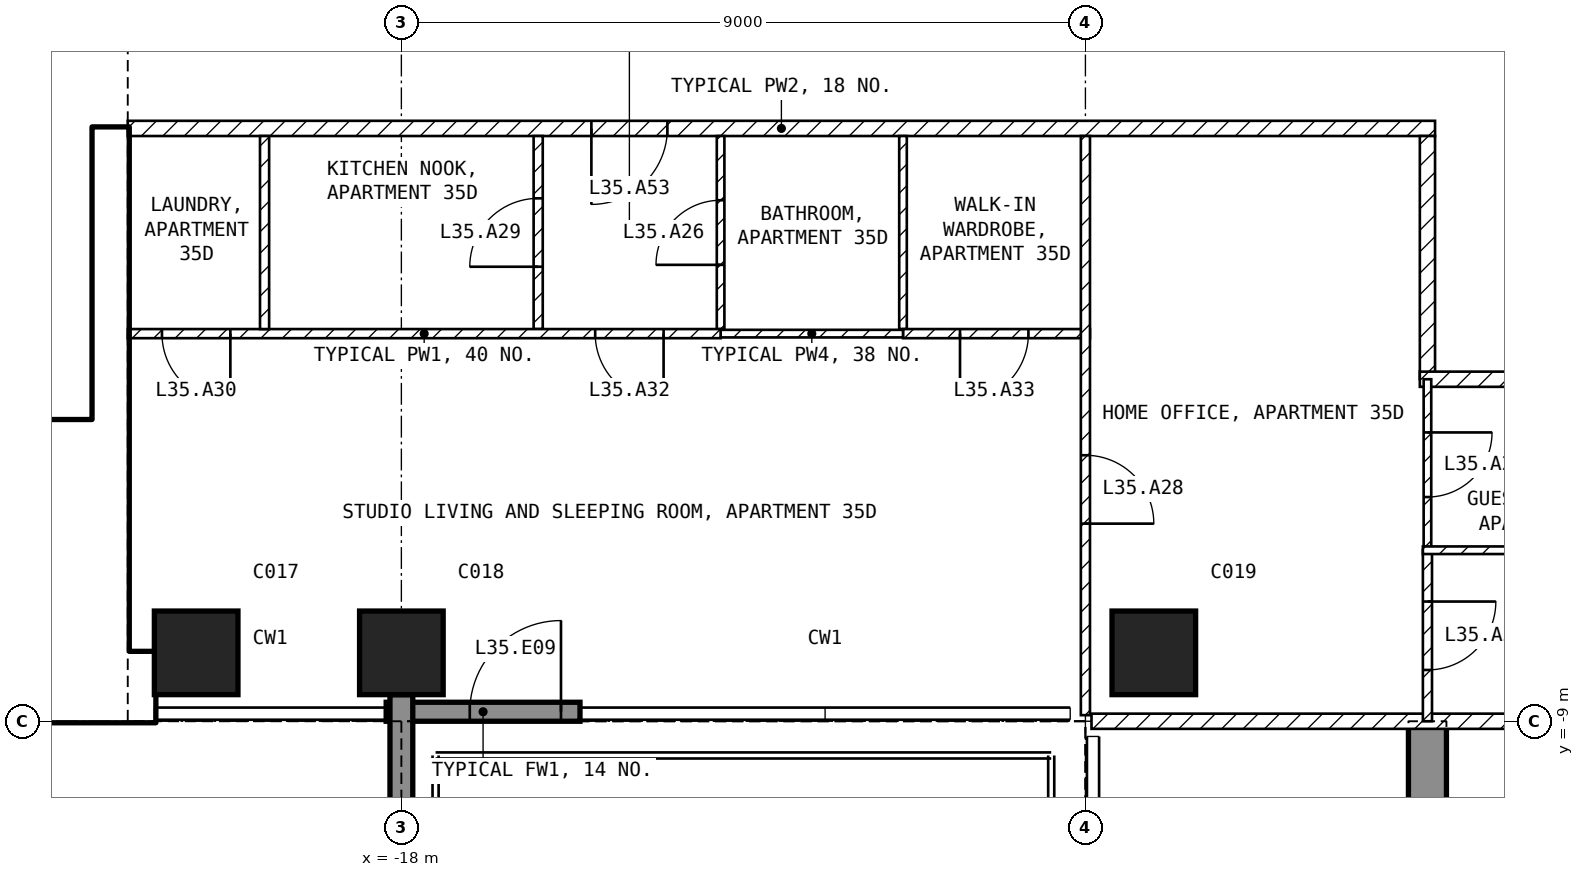
"""IFC4 building model, lengths in metres.
Left out: names, types, materials, properties, quantities, classifications, styles, units other than length and angle.
Written with IfcOpenShell. Run it as: python <this file> out.ifc"""

import sys

from ifc_helpers import new_model, si_unit, direction, frame, frame_2d, origin, origin_2d, place, context, subcontext, project, spatial, polyline, rectangle, outline, extrude, element, fill, save


model = new_model("IFC4")
c1 = context("Model", 3, precision=1e-05, world=origin(), true_north=direction((0.0, 1.0)))
c2 = subcontext(c1, "Body", "Model", "MODEL_VIEW")
j1 = project(units=[si_unit("LENGTHUNIT", "METRE"), si_unit("PLANEANGLEUNIT", "RADIAN")], contexts=[c1])
p1 = place(None, origin())
s1 = spatial("IfcSite", under=j1, at=p1, CompositionType="ELEMENT")
p2 = place(p1, origin())
s2 = spatial("IfcBuilding", under=s1, at=p2, CompositionType="ELEMENT")
p3 = place(p2, frame((0.0, 0.0, 144.4)))
s3 = spatial("IfcBuildingStorey", under=s2, at=p3, CompositionType="ELEMENT", Elevation=144.4)
for number, where, z_axis, x_axis in (
    (1, (-20.7, -8.1, -0.25), (0.0, 0.0, 1.0), (1.0, 0.0, 0.0)),
    (2, (-18.0, -8.1, -0.25), (0.0, 0.0, 1.0), (1.0, 0.0, 0.0)),
    (3, (-8.1, -8.1, -0.25), (0.0, 0.0, 1.0), (1.0, 0.0, 0.0)),
):
    element("IfcColumn", number, at=place(p3, frame(where, z_axis=z_axis, x_axis=x_axis)), inside=s3, PredefinedType="COLUMN", context=c2, shape_type="SweptSolid", body=[
        extrude(rectangle(XDim=1.1, YDim=1.1, at=origin_2d()), origin(), (0.0, 0.0, 1.0), 3.5),
    ])
p4 = place(p3, frame((-4.75, -20.15, -0.25), z_axis=(1.0, 0.0, 0.0), x_axis=(0.0, 1.0, 0.0)))
e4 = element("IfcWall", 4, at=p4, inside=s3, PredefinedType="SHEAR", context=c2, shape_type="SweptSolid", body=[
    extrude(outline(polyline([(0.0, 0.0), (6.65, 0.0), (6.65, 2.65), (9.05, 2.65), (9.05, 0.0), (11.15, 0.0), (11.15, 3.5), (0.0, 3.5), (0.0, 0.0)])), origin(), (0.0, 0.0, 1.0), 0.5),
])
p5 = place(p3, frame((-18.2, -8.875, 0.0), z_axis=(0.0, 0.0, 1.0), x_axis=(1.0, 0.0, 0.0)))
e5 = element("IfcWall", 5, at=p5, inside=s3, PredefinedType="SOLIDWALL", context=c2, shape_type="SweptSolid", body=[
    extrude(rectangle(XDim=2.55, YDim=0.25, at=frame_2d((1.275, 0.0))), origin(), (0.0, 0.0, 1.0), 3.25),
])
p6 = place(p5, frame((1.1, 0.0, 0.0)))
e6 = element("IfcOpeningElement", 6, at=p6, cuts=e5, PredefinedType="OPENING", context=c2, shape_type="SweptSolid", body=[
    extrude(rectangle(XDim=1.2, YDim=2.4, at=frame_2d((0.6, 1.2))), frame((0.0, 0.135, 0.0), z_axis=(0.0, -1.0, 0.0), x_axis=(1.0, 0.0, 0.0)), (0.0, 0.0, 1.0), 0.27),
])
p7 = place(p3, frame((-18.0, -8.65, 0.0), z_axis=(0.0, 0.0, 1.0), x_axis=(0.0, -1.0, 0.0)))
e7 = element("IfcWall", 7, at=p7, inside=s3, PredefinedType="SOLIDWALL", context=c2, shape_type="SweptSolid", body=[
    extrude(rectangle(XDim=3.09, YDim=0.3, at=frame_2d((1.545, 0.0))), origin(), (0.0, 0.0, 1.0), 3.25),
])
p8 = place(p3, frame((-30.2, -8.55, 0.0), z_axis=(0.0, 0.0, 1.0), x_axis=(1.0, 0.0, 0.0)))
e8 = element("IfcWall", 8, at=p8, inside=s3, PredefinedType="SHEAR", context=c2, shape_type="SweptSolid", body=[
    extrude(rectangle(XDim=8.95, YDim=0.9, at=frame_2d((4.475, 0.0))), origin(), (0.0, 0.0, 1.0), 3.25),
])
p9 = place(p3, frame((-21.825, -8.1, 0.0), z_axis=(0.0, 0.0, 1.0), x_axis=(0.0, 1.0, 0.0)))
e9 = element("IfcWall", 9, at=p9, inside=s3, PredefinedType="SHEAR", context=c2, shape_type="SweptSolid", body=[
    extrude(rectangle(XDim=6.9, YDim=0.45, at=frame_2d((3.45, 0.0))), origin(), (0.0, 0.0, 1.0), 3.25),
])
p10 = place(p3, frame((-28.35, -5.15, 0.0), z_axis=(0.0, 0.0, 1.0), x_axis=(1.0, 0.0, 0.0)))
e10 = element("IfcWall", 10, at=p10, inside=s3, PredefinedType="SOLIDWALL", context=c2, shape_type="SweptSolid", body=[
    extrude(rectangle(XDim=6.3, YDim=0.2, at=frame_2d((3.15, 0.0))), origin(), (0.0, 0.0, 1.0), 3.25),
])
p11 = place(p10, frame((5.1, 0.0, 0.0)))
e11 = element("IfcOpeningElement", 11, at=p11, cuts=e10, PredefinedType="OPENING", context=c2, shape_type="SweptSolid", body=[
    extrude(rectangle(XDim=1.0, YDim=2.1, at=frame_2d((0.5, 1.05))), frame((0.0, 0.11, 0.0), z_axis=(0.0, -1.0, 0.0), x_axis=(1.0, 0.0, 0.0)), (0.0, 0.0, 1.0), 0.22),
])
p12 = place(p3, frame((-4.4, -1.2, 0.0), z_axis=(0.0, 0.0, 1.0), x_axis=(-1.0, 0.0, 0.0)))
e12 = element("IfcWall", 12, at=p12, inside=s3, PredefinedType="PARTITIONING", context=c2, shape_type="SweptSolid", body=[
    extrude(rectangle(XDim=17.2, YDim=0.2, at=frame_2d((8.6, 0.0))), origin(), (0.0, 0.0, 1.0), 3.25),
])
p13 = place(p12, frame((10.1, 0.0, 0.0)))
e13 = element("IfcOpeningElement", 13, at=p13, cuts=e12, PredefinedType="OPENING", context=c2, shape_type="SweptSolid", body=[
    extrude(rectangle(XDim=1.0, YDim=2.1, at=frame_2d((0.5, 1.05))), frame((0.0, 0.11, 0.0), z_axis=(0.0, -1.0, 0.0), x_axis=(1.0, 0.0, 0.0)), (0.0, 0.0, 1.0), 0.22),
])
p14 = place(p3, frame((-4.5, -4.5, 0.0), z_axis=(0.0, 0.0, 1.0), x_axis=(0.0, 1.0, 0.0)))
e14 = element("IfcWall", 14, at=p14, inside=s3, PredefinedType="PARTITIONING", context=c2, shape_type="SweptSolid", body=[
    extrude(rectangle(XDim=3.2, YDim=0.2, at=frame_2d((1.6, 0.0))), origin(), (0.0, 0.0, 1.0), 3.25),
])
p15 = place(p3, frame((-1.1, -4.5, 0.0), z_axis=(0.0, 0.0, 1.0), x_axis=(-1.0, 0.0, 0.0)))
e15 = element("IfcWall", 15, at=p15, inside=s3, PredefinedType="PARTITIONING", context=c2, shape_type="SweptSolid", body=[
    extrude(rectangle(XDim=3.5, YDim=0.2, at=frame_2d((1.75, 0.0))), origin(), (0.0, 0.0, 1.0), 3.25),
])
p16 = place(p3, frame((8.92, -9.0, 0.0), z_axis=(0.0, 0.0, 1.0), x_axis=(-1.0, 0.0, 0.0)))
e16 = element("IfcWall", 16, at=p16, inside=s3, PredefinedType="PARTITIONING", context=c2, shape_type="SweptSolid", body=[
    extrude(rectangle(XDim=17.84, YDim=0.2, at=frame_2d((8.92, 0.0))), origin(), (0.0, 0.0, 1.0), 3.25),
])
p17 = place(p16, frame((8.42, 0.0, 0.0)))
e17 = element("IfcOpeningElement", 17, at=p17, cuts=e16, PredefinedType="OPENING", context=c2, shape_type="SweptSolid", body=[
    extrude(rectangle(XDim=1.0, YDim=2.1, at=frame_2d((0.5, 1.05))), frame((0.0, 0.11, 0.0), z_axis=(0.0, -1.0, 0.0), x_axis=(1.0, 0.0, 0.0)), (0.0, 0.0, 1.0), 0.22),
])
p18 = place(p3, frame((-11.4, -3.84, 0.0), z_axis=(0.0, 0.0, 1.0), x_axis=(0.0, 1.0, 0.0)))
e18 = element("IfcWall", 18, at=p18, inside=s3, PredefinedType="PARTITIONING", context=c2, shape_type="SweptSolid", body=[
    extrude(rectangle(XDim=2.54, YDim=0.1, at=frame_2d((1.27, 0.0))), origin(), (0.0, 0.0, 1.0), 3.25),
])
p19 = place(p3, frame((-8.94, -3.9, 0.0), z_axis=(0.0, 0.0, 1.0), x_axis=(-1.0, 0.0, 0.0)))
e19 = element("IfcWall", 19, at=p19, inside=s3, PredefinedType="PARTITIONING", context=c2, shape_type="SweptSolid", body=[
    extrude(rectangle(XDim=2.46, YDim=0.12, at=frame_2d((1.23, 0.0))), origin(), (0.0, 0.0, 1.0), 3.25),
])
p20 = place(p19, frame((0.81, 0.0, 0.0)))
e20 = element("IfcOpeningElement", 20, at=p20, cuts=e19, PredefinedType="OPENING", context=c2, shape_type="SweptSolid", body=[
    extrude(rectangle(XDim=0.9, YDim=2.1, at=frame_2d((0.45, 1.05))), frame((0.0, 0.07, 0.0), z_axis=(0.0, -1.0, 0.0), x_axis=(1.0, 0.0, 0.0)), (0.0, 0.0, 1.0), 0.14),
])
p21 = place(p3, frame((-9.0, -1.3, 0.0), z_axis=(0.0, 0.0, 1.0), x_axis=(0.0, -1.0, 0.0)))
e21 = element("IfcWall", 21, at=p21, inside=s3, PredefinedType="PARTITIONING", context=c2, shape_type="SweptSolid", body=[
    extrude(rectangle(XDim=7.62, YDim=0.12, at=frame_2d((3.81, 0.0))), origin(), (0.0, 0.0, 1.0), 3.25),
])
p22 = place(p21, frame((4.2, 0.0, 0.0)))
e22 = element("IfcOpeningElement", 22, at=p22, cuts=e21, PredefinedType="OPENING", context=c2, shape_type="SweptSolid", body=[
    extrude(rectangle(XDim=0.9, YDim=2.1, at=frame_2d((0.45, 1.05))), frame((0.0, 0.07, 0.0), z_axis=(0.0, -1.0, 0.0), x_axis=(1.0, 0.0, 0.0)), (0.0, 0.0, 1.0), 0.14),
])
p23 = place(p3, frame((-13.8, -3.84, 0.0), z_axis=(0.0, 0.0, 1.0), x_axis=(0.0, 1.0, 0.0)))
e23 = element("IfcWall", 23, at=p23, inside=s3, PredefinedType="PARTITIONING", context=c2, shape_type="SweptSolid", body=[
    extrude(rectangle(XDim=2.54, YDim=0.1, at=frame_2d((1.27, 0.0))), origin(), (0.0, 0.0, 1.0), 3.25),
])
p24 = place(p23, frame((0.845, 0.0, 0.0)))
e24 = element("IfcOpeningElement", 24, at=p24, cuts=e23, PredefinedType="OPENING", context=c2, shape_type="SweptSolid", body=[
    extrude(rectangle(XDim=0.85, YDim=2.1, at=frame_2d((0.425, 1.05))), frame((0.0, 0.06, 0.0), z_axis=(0.0, -1.0, 0.0), x_axis=(1.0, 0.0, 0.0)), (0.0, 0.0, 1.0), 0.12),
])
p25 = place(p3, frame((-11.4, -3.9, 0.0), z_axis=(0.0, 0.0, 1.0), x_axis=(-1.0, 0.0, 0.0)))
e25 = element("IfcWall", 25, at=p25, inside=s3, PredefinedType="PARTITIONING", context=c2, shape_type="SweptSolid", body=[
    extrude(rectangle(XDim=2.4, YDim=0.1, at=frame_2d((1.2, 0.0))), origin(), (0.0, 0.0, 1.0), 3.25),
])
p26 = place(p3, frame((-16.2, -3.84, 0.0), z_axis=(0.0, 0.0, 1.0), x_axis=(0.0, 1.0, 0.0)))
e26 = element("IfcWall", 26, at=p26, inside=s3, PredefinedType="PARTITIONING", context=c2, shape_type="SweptSolid", body=[
    extrude(rectangle(XDim=2.54, YDim=0.12, at=frame_2d((1.27, 0.0))), origin(), (0.0, 0.0, 1.0), 3.25),
])
p27 = place(p26, frame((0.82, 0.0, 0.0)))
e27 = element("IfcOpeningElement", 27, at=p27, cuts=e26, PredefinedType="OPENING", context=c2, shape_type="SweptSolid", body=[
    extrude(rectangle(XDim=0.9, YDim=2.1, at=frame_2d((0.45, 1.05))), frame((0.0, 0.07, 0.0), z_axis=(0.0, -1.0, 0.0), x_axis=(1.0, 0.0, 0.0)), (0.0, 0.0, 1.0), 0.14),
])
p28 = place(p3, frame((-13.8, -3.9, 0.0), z_axis=(0.0, 0.0, 1.0), x_axis=(-1.0, 0.0, 0.0)))
e28 = element("IfcWall", 28, at=p28, inside=s3, PredefinedType="PARTITIONING", context=c2, shape_type="SweptSolid", body=[
    extrude(rectangle(XDim=7.8, YDim=0.12, at=frame_2d((3.9, 0.0))), origin(), (0.0, 0.0, 1.0), 3.25),
])
p29 = place(p28, frame((6.45, 0.0, 0.0)))
e29 = element("IfcOpeningElement", 29, at=p29, cuts=e28, PredefinedType="OPENING", context=c2, shape_type="SweptSolid", body=[
    extrude(rectangle(XDim=0.9, YDim=2.1, at=frame_2d((0.45, 1.05))), frame((0.0, 0.07, 0.0), z_axis=(0.0, -1.0, 0.0), x_axis=(1.0, 0.0, 0.0)), (0.0, 0.0, 1.0), 0.14),
])
p30 = place(p28, frame((0.75, 0.0, 0.0)))
e30 = element("IfcOpeningElement", 30, at=p30, cuts=e28, PredefinedType="OPENING", context=c2, shape_type="SweptSolid", body=[
    extrude(rectangle(XDim=0.9, YDim=2.1, at=frame_2d((0.45, 1.05))), frame((0.0, 0.07, 0.0), z_axis=(0.0, -1.0, 0.0), x_axis=(1.0, 0.0, 0.0)), (0.0, 0.0, 1.0), 0.14),
])
p31 = place(p3, frame((-19.8, -3.84, 0.0), z_axis=(0.0, 0.0, 1.0), x_axis=(0.0, 1.0, 0.0)))
e31 = element("IfcWall", 31, at=p31, inside=s3, PredefinedType="PARTITIONING", context=c2, shape_type="SweptSolid", body=[
    extrude(rectangle(XDim=2.54, YDim=0.12, at=frame_2d((1.27, 0.0))), origin(), (0.0, 0.0, 1.0), 3.25),
])
p32 = place(p3, frame((-4.5, -4.5, 0.0), z_axis=(0.0, 0.0, 1.0), x_axis=(0.0, -1.0, 0.0)))
e32 = element("IfcWall", 32, at=p32, inside=s3, PredefinedType="PARTITIONING", context=c2, shape_type="SweptSolid", body=[
    extrude(rectangle(XDim=2.25, YDim=0.1, at=frame_2d((1.125, 0.0))), origin(), (0.0, 0.0, 1.0), 3.25),
])
p33 = place(p32, frame((0.7, 0.0, 0.0)))
e33 = element("IfcOpeningElement", 33, at=p33, cuts=e32, PredefinedType="OPENING", context=c2, shape_type="SweptSolid", body=[
    extrude(rectangle(XDim=0.85, YDim=2.1, at=frame_2d((0.425, 1.05))), frame((0.0, 0.06, 0.0), z_axis=(0.0, -1.0, 0.0), x_axis=(1.0, 0.0, 0.0)), (0.0, 0.0, 1.0), 0.12),
])
p34 = place(p3, frame((-4.5, -6.75, 0.0), z_axis=(0.0, 0.0, 1.0), x_axis=(0.0, -1.0, 0.0)))
e34 = element("IfcWall", 34, at=p34, inside=s3, PredefinedType="PARTITIONING", context=c2, shape_type="SweptSolid", body=[
    extrude(rectangle(XDim=2.25, YDim=0.12, at=frame_2d((1.125, 0.0))), origin(), (0.0, 0.0, 1.0), 3.25),
])
p35 = place(p34, frame((0.675, 0.0, 0.0)))
e35 = element("IfcOpeningElement", 35, at=p35, cuts=e34, PredefinedType="OPENING", context=c2, shape_type="SweptSolid", body=[
    extrude(rectangle(XDim=0.9, YDim=2.1, at=frame_2d((0.45, 1.05))), frame((0.0, 0.07, 0.0), z_axis=(0.0, -1.0, 0.0), x_axis=(1.0, 0.0, 0.0)), (0.0, 0.0, 1.0), 0.14),
])
p36 = place(p3, frame((-1.1, -6.75, 0.0), z_axis=(0.0, 0.0, 1.0), x_axis=(-1.0, 0.0, 0.0)))
e36 = element("IfcWall", 36, at=p36, inside=s3, PredefinedType="PARTITIONING", context=c2, shape_type="SweptSolid", body=[
    extrude(rectangle(XDim=3.46, YDim=0.1, at=frame_2d((1.73, 0.0))), origin(), (0.0, 0.0, 1.0), 3.25),
])
p37 = place(p6, origin())
e37 = element("IfcDoor", 37, at=p37, inside=s3, OperationType="SINGLE_SWING_RIGHT", PredefinedType="DOOR", context=c2, shape_type="SweptSolid", body=[
    extrude(rectangle(XDim=1.2, YDim=2.4, at=frame_2d((0.6, 1.2))), frame((0.0, 0.025, 0.0), z_axis=(0.0, -1.0, 0.0), x_axis=(1.0, 0.0, 0.0)), (0.0, 0.0, 1.0), 0.05),
])
fill(e6, e37)
p38 = place(p11, origin())
e38 = element("IfcDoor", 38, at=p38, inside=s3, OperationType="SINGLE_SWING_LEFT", PredefinedType="DOOR", context=c2, shape_type="SweptSolid", body=[
    extrude(rectangle(XDim=1.0, YDim=2.1, at=frame_2d((0.5, 1.05))), frame((0.0, 0.025, 0.0), z_axis=(0.0, -1.0, 0.0), x_axis=(1.0, 0.0, 0.0)), (0.0, 0.0, 1.0), 0.05),
])
fill(e11, e38)
p39 = place(p24, origin())
e39 = element("IfcDoor", 39, at=p39, inside=s3, OperationType="SINGLE_SWING_LEFT", PredefinedType="DOOR", context=c2, shape_type="SweptSolid", body=[
    extrude(rectangle(XDim=0.85, YDim=2.1, at=frame_2d((0.425, 1.05))), frame((0.0, 0.025, 0.0), z_axis=(0.0, -1.0, 0.0), x_axis=(1.0, 0.0, 0.0)), (0.0, 0.0, 1.0), 0.05),
])
fill(e24, e39)
p40 = place(p33, origin())
e40 = element("IfcDoor", 40, at=p40, inside=s3, OperationType="SINGLE_SWING_LEFT", PredefinedType="DOOR", context=c2, shape_type="SweptSolid", body=[
    extrude(rectangle(XDim=0.85, YDim=2.1, at=frame_2d((0.425, 1.05))), frame((0.0, 0.025, 0.0), z_axis=(0.0, -1.0, 0.0), x_axis=(1.0, 0.0, 0.0)), (0.0, 0.0, 1.0), 0.05),
])
fill(e33, e40)
p41 = place(p22, origin())
e41 = element("IfcDoor", 41, at=p41, inside=s3, OperationType="SINGLE_SWING_RIGHT", PredefinedType="DOOR", context=c2, shape_type="SweptSolid", body=[
    extrude(rectangle(XDim=0.9, YDim=2.1, at=frame_2d((0.45, 1.05))), frame((0.0, 0.025, 0.0), z_axis=(0.0, -1.0, 0.0), x_axis=(1.0, 0.0, 0.0)), (0.0, 0.0, 1.0), 0.05),
])
fill(e22, e41)
p42 = place(p27, origin())
e42 = element("IfcDoor", 42, at=p42, inside=s3, OperationType="SINGLE_SWING_LEFT", PredefinedType="DOOR", context=c2, shape_type="SweptSolid", body=[
    extrude(rectangle(XDim=0.9, YDim=2.1, at=frame_2d((0.45, 1.05))), frame((0.0, 0.025, 0.0), z_axis=(0.0, -1.0, 0.0), x_axis=(1.0, 0.0, 0.0)), (0.0, 0.0, 1.0), 0.05),
])
fill(e27, e42)
p43 = place(p29, origin())
e43 = element("IfcDoor", 43, at=p43, inside=s3, OperationType="SINGLE_SWING_LEFT", PredefinedType="DOOR", context=c2, shape_type="SweptSolid", body=[
    extrude(rectangle(XDim=0.9, YDim=2.1, at=frame_2d((0.45, 1.05))), frame((0.0, 0.025, 0.0), z_axis=(0.0, -1.0, 0.0), x_axis=(1.0, 0.0, 0.0)), (0.0, 0.0, 1.0), 0.05),
])
fill(e29, e43)
p44 = place(p35, origin())
e44 = element("IfcDoor", 44, at=p44, inside=s3, OperationType="SINGLE_SWING_LEFT", PredefinedType="DOOR", context=c2, shape_type="SweptSolid", body=[
    extrude(rectangle(XDim=0.9, YDim=2.1, at=frame_2d((0.45, 1.05))), frame((0.0, 0.025, 0.0), z_axis=(0.0, -1.0, 0.0), x_axis=(1.0, 0.0, 0.0)), (0.0, 0.0, 1.0), 0.05),
])
fill(e35, e44)
p45 = place(p30, origin())
e45 = element("IfcDoor", 45, at=p45, inside=s3, OperationType="SINGLE_SWING_LEFT", PredefinedType="DOOR", context=c2, shape_type="SweptSolid", body=[
    extrude(rectangle(XDim=0.9, YDim=2.1, at=frame_2d((0.45, 1.05))), frame((0.0, 0.025, 0.0), z_axis=(0.0, -1.0, 0.0), x_axis=(1.0, 0.0, 0.0)), (0.0, 0.0, 1.0), 0.05),
])
fill(e30, e45)
p46 = place(p20, origin())
e46 = element("IfcDoor", 46, at=p46, inside=s3, OperationType="SINGLE_SWING_RIGHT", PredefinedType="DOOR", context=c2, shape_type="SweptSolid", body=[
    extrude(rectangle(XDim=0.9, YDim=2.1, at=frame_2d((0.45, 1.05))), frame((0.0, 0.025, 0.0), z_axis=(0.0, -1.0, 0.0), x_axis=(1.0, 0.0, 0.0)), (0.0, 0.0, 1.0), 0.05),
])
fill(e20, e46)
p47 = place(p13, origin())
e47 = element("IfcDoor", 47, at=p47, inside=s3, OperationType="SINGLE_SWING_RIGHT", PredefinedType="DOOR", context=c2, shape_type="SweptSolid", body=[
    extrude(rectangle(XDim=1.0, YDim=2.1, at=frame_2d((0.5, 1.05))), frame((0.0, 0.025, 0.0), z_axis=(0.0, -1.0, 0.0), x_axis=(1.0, 0.0, 0.0)), (0.0, 0.0, 1.0), 0.05),
])
fill(e13, e47)
save(model, sys.argv[1])
